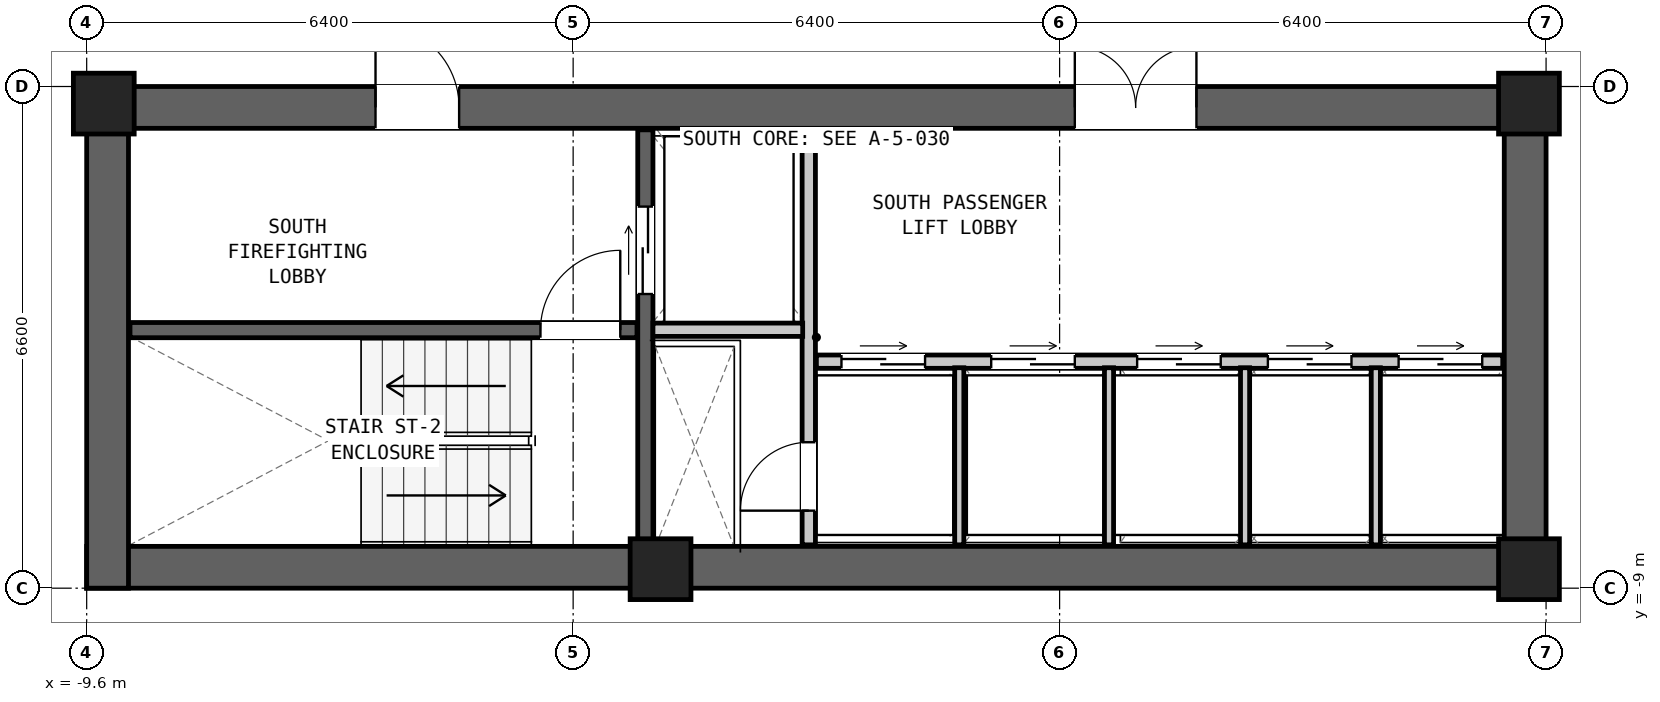
"""IFC4 building model, lengths in metres.
Left out: names, types, materials, properties, quantities, classifications, styles, units other than length and angle.
Written with IfcOpenShell. Run it as: python <this file> out.ifc"""

import sys

from ifc_helpers import new_model, si_unit, direction, frame, frame_2d, origin, origin_2d, place, context, subcontext, project, spatial, rectangle, extrude, element, fill, save


model = new_model("IFC4")
c1 = context("Model", 3, precision=1e-05, world=origin(), true_north=direction((0.0, 1.0)))
c2 = subcontext(c1, "Body", "Model", "MODEL_VIEW")
j1 = project(units=[si_unit("LENGTHUNIT", "METRE"), si_unit("PLANEANGLEUNIT", "RADIAN")], contexts=[c1])
p1 = place(None, origin())
s1 = spatial("IfcSite", under=j1, at=p1, CompositionType="ELEMENT")
p2 = place(p1, origin())
s2 = spatial("IfcBuilding", under=s1, at=p2, CompositionType="ELEMENT")
p3 = place(p2, frame((0.0, 0.0, 93.85)))
s3 = spatial("IfcBuildingStorey", under=s2, at=p3, CompositionType="ELEMENT", Elevation=93.85)
p4 = place(p3, frame((-9.6, -8.725, 0.0), z_axis=(0.0, 0.0, 1.0), x_axis=(1.0, 0.0, 0.0)))
e1 = element("IfcWall", 1, at=p4, inside=s3, PredefinedType="SHEAR", context=c2, shape_type="SweptSolid", body=[
    extrude(rectangle(XDim=19.2, YDim=0.55, at=frame_2d((9.6, 0.0))), origin(), (0.0, 0.0, 1.0), 3.05),
])
p5 = place(p3, frame((-9.6, -2.675, 0.0), z_axis=(0.0, 0.0, 1.0), x_axis=(1.0, 0.0, 0.0)))
e2 = element("IfcWall", 2, at=p5, inside=s3, PredefinedType="SHEAR", context=c2, shape_type="SweptSolid", body=[
    extrude(rectangle(XDim=19.2, YDim=0.55, at=frame_2d((9.6, 0.0))), origin(), (0.0, 0.0, 1.0), 3.05),
])
p6 = place(p5, frame((3.8, 0.0, 0.0)))
e3 = element("IfcOpeningElement", 3, at=p6, cuts=e2, PredefinedType="OPENING", context=c2, shape_type="SweptSolid", body=[
    extrude(rectangle(XDim=1.1, YDim=2.08, at=frame_2d((0.55, 1.04))), frame((0.0, 0.287, 0.0), z_axis=(0.0, -1.0, 0.0), x_axis=(1.0, 0.0, 0.0)), (0.0, 0.0, 1.0), 0.574),
])
p7 = place(p5, frame((13.0, 0.0, 0.0)))
e4 = element("IfcOpeningElement", 4, at=p7, cuts=e2, PredefinedType="OPENING", context=c2, shape_type="SweptSolid", body=[
    extrude(rectangle(XDim=1.6, YDim=2.12, at=frame_2d((0.8, 1.06))), frame((0.0, 0.287, 0.0), z_axis=(0.0, -1.0, 0.0), x_axis=(1.0, 0.0, 0.0)), (0.0, 0.0, 1.0), 0.574),
])
for number, where, z_axis, x_axis in (
    (5, (-9.325, -9.0, 0.0), (0.0, 0.0, 1.0), (0.0, 1.0, 0.0)),
    (6, (9.325, -9.0, 0.0), (0.0, 0.0, 1.0), (0.0, 1.0, 0.0)),
):
    element("IfcWall", number, at=place(p3, frame(where, z_axis=z_axis, x_axis=x_axis)), inside=s3, PredefinedType="SHEAR", context=c2, shape_type="SweptSolid", body=[
        extrude(rectangle(XDim=6.6, YDim=0.55, at=frame_2d((3.3, 0.0))), origin(), (0.0, 0.0, 1.0), 3.05),
    ])
for number, where, z_axis, x_axis in (
    (7, (-9.375, -2.625, 0.0), (0.0, 0.0, 1.0), (1.0, 0.0, 0.0)),
    (8, (9.375, -2.625, 0.0), (0.0, 0.0, 1.0), (1.0, 0.0, 0.0)),
    (9, (-2.05, -8.75, 0.0), (0.0, 0.0, 1.0), (1.0, 0.0, 0.0)),
    (10, (9.375, -8.75, 0.0), (0.0, 0.0, 1.0), (1.0, 0.0, 0.0)),
):
    element("IfcColumn", number, at=place(p3, frame(where, z_axis=z_axis, x_axis=x_axis)), inside=s3, PredefinedType="COLUMN", context=c2, shape_type="SweptSolid", body=[
        extrude(rectangle(XDim=0.8, YDim=0.8, at=origin_2d()), origin(), (0.0, 0.0, 1.0), 3.05),
    ])
p8 = place(p3, frame((-9.03, -5.605, 0.0), z_axis=(0.0, 0.0, 1.0), x_axis=(1.0, 0.0, 0.0)))
e11 = element("IfcWall", 11, at=p8, inside=s3, PredefinedType="SHEAR", context=c2, shape_type="SweptSolid", body=[
    extrude(rectangle(XDim=6.67, YDim=0.2, at=frame_2d((3.335, 0.0))), origin(), (0.0, 0.0, 1.0), 2.83),
])
p9 = place(p8, frame((5.4, 0.0, 0.0)))
e12 = element("IfcOpeningElement", 12, at=p9, cuts=e11, PredefinedType="OPENING", context=c2, shape_type="SweptSolid", body=[
    extrude(rectangle(XDim=1.05, YDim=2.08, at=frame_2d((0.525, 1.04))), frame((0.0, 0.112, 0.0), z_axis=(0.0, -1.0, 0.0), x_axis=(1.0, 0.0, 0.0)), (0.0, 0.0, 1.0), 0.224),
])
p10 = place(p3, frame((-2.25, -8.43, 0.0), z_axis=(0.0, 0.0, 1.0), x_axis=(0.0, 1.0, 0.0)))
e13 = element("IfcWall", 13, at=p10, inside=s3, PredefinedType="SHEAR", context=c2, shape_type="SweptSolid", body=[
    extrude(rectangle(XDim=5.46, YDim=0.2, at=frame_2d((2.73, 0.0))), origin(), (0.0, 0.0, 1.0), 2.83),
])
p11 = place(p10, frame((3.3, 0.0, 0.0)))
e14 = element("IfcOpeningElement", 14, at=p11, cuts=e13, PredefinedType="OPENING", context=c2, shape_type="SweptSolid", body=[
    extrude(rectangle(XDim=1.15, YDim=2.08, at=frame_2d((0.575, 1.04))), frame((0.0, 0.112, 0.0), z_axis=(0.0, -1.0, 0.0), x_axis=(1.0, 0.0, 0.0)), (0.0, 0.0, 1.0), 0.224),
])
p12 = place(p3, frame((-0.1, -8.43, 0.0), z_axis=(0.0, 0.0, 1.0), x_axis=(0.0, 1.0, 0.0)))
e15 = element("IfcWall", 15, at=p12, inside=s3, PredefinedType="PARTITIONING", context=c2, shape_type="SweptSolid", body=[
    extrude(rectangle(XDim=5.46, YDim=0.175, at=frame_2d((2.73, 0.0))), origin(), (0.0, 0.0, 1.0), 2.83),
])
p13 = place(p12, frame((0.45, 0.0, 0.0)))
e16 = element("IfcOpeningElement", 16, at=p13, cuts=e15, PredefinedType="OPENING", context=c2, shape_type="SweptSolid", body=[
    extrude(rectangle(XDim=0.9, YDim=2.05, at=frame_2d((0.45, 1.025))), frame((0.0, 0.1, 0.0), z_axis=(0.0, -1.0, 0.0), x_axis=(1.0, 0.0, 0.0)), (0.0, 0.0, 1.0), 0.199),
])
p14 = place(p3, frame((-2.15, -5.6, 0.0), z_axis=(0.0, 0.0, 1.0), x_axis=(1.0, 0.0, 0.0)))
e17 = element("IfcWall", 17, at=p14, inside=s3, PredefinedType="PARTITIONING", context=c2, shape_type="SweptSolid", body=[
    extrude(rectangle(XDim=1.97, YDim=0.175, at=frame_2d((0.985, 0.0))), origin(), (0.0, 0.0, 1.0), 2.83),
])
p15 = place(p3, frame((0.0, -6.02, 0.0), z_axis=(0.0, 0.0, 1.0), x_axis=(1.0, 0.0, 0.0)))
e18 = element("IfcWall", 18, at=p15, inside=s3, PredefinedType="PARTITIONING", context=c2, shape_type="SweptSolid", body=[
    extrude(rectangle(XDim=9.03, YDim=0.175, at=frame_2d((4.515, 0.0))), origin(), (0.0, 0.0, 1.0), 2.83),
])
p16 = place(p15, frame((0.33, 0.0, 0.0)))
e19 = element("IfcOpeningElement", 19, at=p16, cuts=e18, PredefinedType="OPENING", context=c2, shape_type="SweptSolid", body=[
    extrude(rectangle(XDim=1.1, YDim=2.06, at=frame_2d((0.55, 1.03))), frame((0.0, 0.1, 0.0), z_axis=(0.0, -1.0, 0.0), x_axis=(1.0, 0.0, 0.0)), (0.0, 0.0, 1.0), 0.199),
])
p17 = place(p15, frame((2.3, 0.0, 0.0)))
e20 = element("IfcOpeningElement", 20, at=p17, cuts=e18, PredefinedType="OPENING", context=c2, shape_type="SweptSolid", body=[
    extrude(rectangle(XDim=1.1, YDim=2.06, at=frame_2d((0.55, 1.03))), frame((0.0, 0.1, 0.0), z_axis=(0.0, -1.0, 0.0), x_axis=(1.0, 0.0, 0.0)), (0.0, 0.0, 1.0), 0.199),
])
p18 = place(p15, frame((4.22, 0.0, 0.0)))
e21 = element("IfcOpeningElement", 21, at=p18, cuts=e18, PredefinedType="OPENING", context=c2, shape_type="SweptSolid", body=[
    extrude(rectangle(XDim=1.1, YDim=2.06, at=frame_2d((0.55, 1.03))), frame((0.0, 0.1, 0.0), z_axis=(0.0, -1.0, 0.0), x_axis=(1.0, 0.0, 0.0)), (0.0, 0.0, 1.0), 0.199),
])
p19 = place(p15, frame((5.94, 0.0, 0.0)))
e22 = element("IfcOpeningElement", 22, at=p19, cuts=e18, PredefinedType="OPENING", context=c2, shape_type="SweptSolid", body=[
    extrude(rectangle(XDim=1.1, YDim=2.06, at=frame_2d((0.55, 1.03))), frame((0.0, 0.1, 0.0), z_axis=(0.0, -1.0, 0.0), x_axis=(1.0, 0.0, 0.0)), (0.0, 0.0, 1.0), 0.199),
])
p20 = place(p15, frame((7.66, 0.0, 0.0)))
e23 = element("IfcOpeningElement", 23, at=p20, cuts=e18, PredefinedType="OPENING", context=c2, shape_type="SweptSolid", body=[
    extrude(rectangle(XDim=1.1, YDim=2.06, at=frame_2d((0.55, 1.03))), frame((0.0, 0.1, 0.0), z_axis=(0.0, -1.0, 0.0), x_axis=(1.0, 0.0, 0.0)), (0.0, 0.0, 1.0), 0.199),
])
for number, where, z_axis, x_axis in (
    (24, (1.88, -8.43, 0.0), (0.0, 0.0, 1.0), (0.0, 1.0, 0.0)),
    (25, (3.85, -8.43, 0.0), (0.0, 0.0, 1.0), (0.0, 1.0, 0.0)),
    (26, (5.64, -8.43, 0.0), (0.0, 0.0, 1.0), (0.0, 1.0, 0.0)),
    (27, (7.36, -8.43, 0.0), (0.0, 0.0, 1.0), (0.0, 1.0, 0.0)),
):
    element("IfcWall", number, at=place(p3, frame(where, z_axis=z_axis, x_axis=x_axis)), inside=s3, PredefinedType="PARTITIONING", context=c2, shape_type="SweptSolid", body=[
        extrude(rectangle(XDim=2.33, YDim=0.12, at=frame_2d((1.165, 0.0))), origin(), (0.0, 0.0, 1.0), 2.83),
    ])
p21 = place(p9, origin())
e28 = element("IfcDoor", 28, at=p21, inside=s3, OperationType="SINGLE_SWING_RIGHT", PredefinedType="DOOR", context=c2, shape_type="SweptSolid", body=[
    extrude(rectangle(XDim=1.05, YDim=2.08, at=frame_2d((0.525, 1.04))), frame((0.0, 0.025, 0.0), z_axis=(0.0, -1.0, 0.0), x_axis=(1.0, 0.0, 0.0)), (0.0, 0.0, 1.0), 0.05),
])
fill(e12, e28)
p22 = place(p6, origin())
e29 = element("IfcDoor", 29, at=p22, inside=s3, OperationType="SINGLE_SWING_LEFT", PredefinedType="DOOR", context=c2, shape_type="SweptSolid", body=[
    extrude(rectangle(XDim=1.1, YDim=2.08, at=frame_2d((0.55, 1.04))), frame((0.0, 0.025, 0.0), z_axis=(0.0, -1.0, 0.0), x_axis=(1.0, 0.0, 0.0)), (0.0, 0.0, 1.0), 0.05),
])
fill(e3, e29)
p23 = place(p11, origin())
e30 = element("IfcDoor", 30, at=p23, inside=s3, OperationType="DOUBLE_DOOR_SLIDING", PredefinedType="DOOR", context=c2, shape_type="SweptSolid", body=[
    extrude(rectangle(XDim=1.15, YDim=2.08, at=frame_2d((0.575, 1.04))), frame((0.0, 0.025, 0.0), z_axis=(0.0, -1.0, 0.0), x_axis=(1.0, 0.0, 0.0)), (0.0, 0.0, 1.0), 0.05),
])
fill(e14, e30)
p24 = place(p13, origin())
e31 = element("IfcDoor", 31, at=p24, inside=s3, OperationType="SINGLE_SWING_LEFT", PredefinedType="DOOR", context=c2, shape_type="SweptSolid", body=[
    extrude(rectangle(XDim=0.9, YDim=2.05, at=frame_2d((0.45, 1.025))), frame((0.0, 0.025, 0.0), z_axis=(0.0, -1.0, 0.0), x_axis=(1.0, 0.0, 0.0)), (0.0, 0.0, 1.0), 0.05),
])
fill(e16, e31)
p25 = place(p7, origin())
e32 = element("IfcDoor", 32, at=p25, inside=s3, OperationType="DOUBLE_DOOR_SINGLE_SWING", PredefinedType="DOOR", context=c2, shape_type="SweptSolid", body=[
    extrude(rectangle(XDim=1.6, YDim=2.12, at=frame_2d((0.8, 1.06))), frame((0.0, 0.025, 0.0), z_axis=(0.0, -1.0, 0.0), x_axis=(1.0, 0.0, 0.0)), (0.0, 0.0, 1.0), 0.05),
])
fill(e4, e32)
p26 = place(p16, origin())
e33 = element("IfcDoor", 33, at=p26, inside=s3, OperationType="DOUBLE_DOOR_SLIDING", PredefinedType="DOOR", context=c2, shape_type="SweptSolid", body=[
    extrude(rectangle(XDim=1.1, YDim=2.06, at=frame_2d((0.55, 1.03))), frame((0.0, 0.025, 0.0), z_axis=(0.0, -1.0, 0.0), x_axis=(1.0, 0.0, 0.0)), (0.0, 0.0, 1.0), 0.05),
])
fill(e19, e33)
p27 = place(p17, origin())
e34 = element("IfcDoor", 34, at=p27, inside=s3, OperationType="DOUBLE_DOOR_SLIDING", PredefinedType="DOOR", context=c2, shape_type="SweptSolid", body=[
    extrude(rectangle(XDim=1.1, YDim=2.06, at=frame_2d((0.55, 1.03))), frame((0.0, 0.025, 0.0), z_axis=(0.0, -1.0, 0.0), x_axis=(1.0, 0.0, 0.0)), (0.0, 0.0, 1.0), 0.05),
])
fill(e20, e34)
p28 = place(p18, origin())
e35 = element("IfcDoor", 35, at=p28, inside=s3, OperationType="DOUBLE_DOOR_SLIDING", PredefinedType="DOOR", context=c2, shape_type="SweptSolid", body=[
    extrude(rectangle(XDim=1.1, YDim=2.06, at=frame_2d((0.55, 1.03))), frame((0.0, 0.025, 0.0), z_axis=(0.0, -1.0, 0.0), x_axis=(1.0, 0.0, 0.0)), (0.0, 0.0, 1.0), 0.05),
])
fill(e21, e35)
p29 = place(p19, origin())
e36 = element("IfcDoor", 36, at=p29, inside=s3, OperationType="DOUBLE_DOOR_SLIDING", PredefinedType="DOOR", context=c2, shape_type="SweptSolid", body=[
    extrude(rectangle(XDim=1.1, YDim=2.06, at=frame_2d((0.55, 1.03))), frame((0.0, 0.025, 0.0), z_axis=(0.0, -1.0, 0.0), x_axis=(1.0, 0.0, 0.0)), (0.0, 0.0, 1.0), 0.05),
])
fill(e22, e36)
p30 = place(p20, origin())
e37 = element("IfcDoor", 37, at=p30, inside=s3, OperationType="DOUBLE_DOOR_SLIDING", PredefinedType="DOOR", context=c2, shape_type="SweptSolid", body=[
    extrude(rectangle(XDim=1.1, YDim=2.06, at=frame_2d((0.55, 1.03))), frame((0.0, 0.025, 0.0), z_axis=(0.0, -1.0, 0.0), x_axis=(1.0, 0.0, 0.0)), (0.0, 0.0, 1.0), 0.05),
])
fill(e23, e37)
save(model, sys.argv[1])
